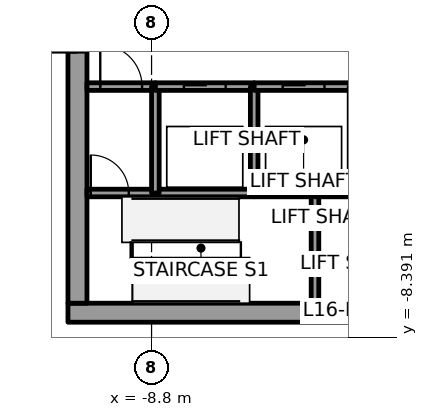
"""IFC4 building model, lengths in metres.
Left out: names, types, materials, properties, quantities, classifications, styles, units other than length and angle.
Written with IfcOpenShell. Run it as: python <this file> out.ifc"""

import sys

from ifc_helpers import new_model, si_unit, direction, frame, frame_2d, origin, place, context, subcontext, project, spatial, rectangle, extrude, element, fill, save


model = new_model("IFC4")
c1 = context("Model", 3, precision=1e-05, world=origin(), true_north=direction((0.0, 1.0)))
c2 = subcontext(c1, "Body", "Model", "MODEL_VIEW")
j1 = project(units=[si_unit("LENGTHUNIT", "METRE"), si_unit("PLANEANGLEUNIT", "RADIAN")], contexts=[c1])
p1 = place(None, origin())
s1 = spatial("IfcSite", under=j1, at=p1, CompositionType="ELEMENT")
p2 = place(p1, origin())
s2 = spatial("IfcBuilding", under=s1, at=p2, CompositionType="ELEMENT")
p3 = place(p2, frame((0.0, 0.0, 81.3)))
s3 = spatial("IfcBuildingStorey", under=s2, at=p3, CompositionType="ELEMENT", Elevation=81.3)
p4 = place(p3, frame((-11.0, -7.75, 0.0), z_axis=(0.0, 0.0, 1.0), x_axis=(1.0, 0.0, 0.0)))
e1 = element("IfcWall", 1, at=p4, inside=s3, PredefinedType="SHEAR", context=c2, shape_type="SweptSolid", body=[
    extrude(rectangle(XDim=22.0, YDim=0.5, at=frame_2d((11.0, 0.0))), origin(), (0.0, 0.0, 1.0), 3.7),
])
p5 = place(p4, frame((10.45, 0.0, 0.0)))
e2 = element("IfcOpeningElement", 2, at=p5, cuts=e1, PredefinedType="OPENING", context=c2, shape_type="SweptSolid", body=[
    extrude(rectangle(XDim=1.1, YDim=2.1, at=frame_2d((0.55, 1.05))), frame((0.0, 0.25, 0.0), z_axis=(0.0, -1.0, 0.0), x_axis=(1.0, 0.0, 0.0)), (0.0, 0.0, 1.0), 0.5),
])
p6 = place(p3, frame((-10.75, -7.5, 0.0), z_axis=(0.0, 0.0, 1.0), x_axis=(0.0, 1.0, 0.0)))
e3 = element("IfcWall", 3, at=p6, inside=s3, PredefinedType="SHEAR", context=c2, shape_type="SweptSolid", body=[
    extrude(rectangle(XDim=15.0, YDim=0.5, at=frame_2d((7.5, 0.0))), origin(), (0.0, 0.0, 1.0), 3.7),
])
p7 = place(p6, frame((6.6, 0.0, 0.0)))
e4 = element("IfcOpeningElement", 4, at=p7, cuts=e3, PredefinedType="OPENING", context=c2, shape_type="SweptSolid", body=[
    extrude(rectangle(XDim=1.8, YDim=2.1, at=frame_2d((0.9, 1.05))), frame((0.0, 0.25, 0.0), z_axis=(0.0, -1.0, 0.0), x_axis=(1.0, 0.0, 0.0)), (0.0, 0.0, 1.0), 0.5),
])
p8 = place(p3, frame((-10.5, -4.6, 0.0), z_axis=(0.0, 0.0, 1.0), x_axis=(1.0, 0.0, 0.0)))
e5 = element("IfcWall", 5, at=p8, inside=s3, PredefinedType="SOLIDWALL", context=c2, shape_type="SweptSolid", body=[
    extrude(rectangle(XDim=1.8, YDim=0.2, at=frame_2d((0.9, 0.0))), origin(), (0.0, 0.0, 1.0), 3.55),
])
p9 = place(p8, frame((0.1, 0.0, 0.0)))
e6 = element("IfcOpeningElement", 6, at=p9, cuts=e5, PredefinedType="OPENING", context=c2, shape_type="SweptSolid", body=[
    extrude(rectangle(XDim=1.0, YDim=2.1, at=frame_2d((0.5, 1.05))), frame((0.0, 0.1, 0.0), z_axis=(0.0, -1.0, 0.0), x_axis=(1.0, 0.0, 0.0)), (0.0, 0.0, 1.0), 0.2),
])
p10 = place(p3, frame((-10.5, -1.8, 0.0), z_axis=(0.0, 0.0, 1.0), x_axis=(1.0, 0.0, 0.0)))
e7 = element("IfcWall", 7, at=p10, inside=s3, PredefinedType="SOLIDWALL", context=c2, shape_type="SweptSolid", body=[
    extrude(rectangle(XDim=1.8, YDim=0.2, at=frame_2d((0.9, 0.0))), origin(), (0.0, 0.0, 1.0), 3.55),
])
p11 = place(p10, frame((0.35, 0.0, 0.0)))
e8 = element("IfcOpeningElement", 8, at=p11, cuts=e7, PredefinedType="OPENING", context=c2, shape_type="SweptSolid", body=[
    extrude(rectangle(XDim=1.1, YDim=2.1, at=frame_2d((0.55, 1.05))), frame((0.0, 0.1, 0.0), z_axis=(0.0, -1.0, 0.0), x_axis=(1.0, 0.0, 0.0)), (0.0, 0.0, 1.0), 0.2),
])
p12 = place(p3, frame((-8.7, -4.6, 0.0), z_axis=(0.0, 0.0, 1.0), x_axis=(1.0, 0.0, 0.0)))
e9 = element("IfcWall", 9, at=p12, inside=s3, PredefinedType="SOLIDWALL", context=c2, shape_type="SweptSolid", body=[
    extrude(rectangle(XDim=2.6, YDim=0.2, at=frame_2d((1.3, 0.0))), origin(), (0.0, 0.0, 1.0), 3.55),
])
p13 = place(p3, frame((-8.7, -4.6, 0.0), z_axis=(0.0, 0.0, 1.0), x_axis=(0.0, 1.0, 0.0)))
e10 = element("IfcWall", 10, at=p13, inside=s3, PredefinedType="SOLIDWALL", context=c2, shape_type="SweptSolid", body=[
    extrude(rectangle(XDim=2.8, YDim=0.2, at=frame_2d((1.4, 0.0))), origin(), (0.0, 0.0, 1.0), 3.55),
])
p14 = place(p3, frame((-8.7, -1.8, 0.0), z_axis=(0.0, 0.0, 1.0), x_axis=(1.0, 0.0, 0.0)))
e11 = element("IfcWall", 11, at=p14, inside=s3, PredefinedType="SOLIDWALL", context=c2, shape_type="SweptSolid", body=[
    extrude(rectangle(XDim=2.6, YDim=0.2, at=frame_2d((1.3, 0.0))), origin(), (0.0, 0.0, 1.0), 3.55),
])
p15 = place(p14, frame((0.75, 0.0, 0.0)))
e12 = element("IfcOpeningElement", 12, at=p15, cuts=e11, PredefinedType="OPENING", context=c2, shape_type="SweptSolid", body=[
    extrude(rectangle(XDim=1.1, YDim=2.1, at=frame_2d((0.55, 1.05))), frame((0.0, 0.1, 0.0), z_axis=(0.0, -1.0, 0.0), x_axis=(1.0, 0.0, 0.0)), (0.0, 0.0, 1.0), 0.2),
])
p16 = place(p3, frame((-6.1, -4.6, 0.0), z_axis=(0.0, 0.0, 1.0), x_axis=(1.0, 0.0, 0.0)))
e13 = element("IfcWall", 13, at=p16, inside=s3, PredefinedType="SOLIDWALL", context=c2, shape_type="SweptSolid", body=[
    extrude(rectangle(XDim=1.6, YDim=0.2, at=frame_2d((0.8, 0.0))), origin(), (0.0, 0.0, 1.0), 3.55),
])
p17 = place(p3, frame((-6.1, -4.6, 0.0), z_axis=(0.0, 0.0, 1.0), x_axis=(0.0, 1.0, 0.0)))
e14 = element("IfcWall", 14, at=p17, inside=s3, PredefinedType="SOLIDWALL", context=c2, shape_type="SweptSolid", body=[
    extrude(rectangle(XDim=2.8, YDim=0.2, at=frame_2d((1.4, 0.0))), origin(), (0.0, 0.0, 1.0), 3.55),
])
p18 = place(p3, frame((-6.1, -1.8, 0.0), z_axis=(0.0, 0.0, 1.0), x_axis=(1.0, 0.0, 0.0)))
e15 = element("IfcWall", 15, at=p18, inside=s3, PredefinedType="SOLIDWALL", context=c2, shape_type="SweptSolid", body=[
    extrude(rectangle(XDim=2.6, YDim=0.2, at=frame_2d((1.3, 0.0))), origin(), (0.0, 0.0, 1.0), 3.55),
])
p19 = place(p18, frame((0.75, 0.0, 0.0)))
e16 = element("IfcOpeningElement", 16, at=p19, cuts=e15, PredefinedType="OPENING", context=c2, shape_type="SweptSolid", body=[
    extrude(rectangle(XDim=1.1, YDim=2.1, at=frame_2d((0.55, 1.05))), frame((0.0, 0.1, 0.0), z_axis=(0.0, -1.0, 0.0), x_axis=(1.0, 0.0, 0.0)), (0.0, 0.0, 1.0), 0.2),
])
p20 = place(p3, frame((-4.5, -4.6, 0.0), z_axis=(0.0, 0.0, 1.0), x_axis=(0.0, -1.0, 0.0)))
e17 = element("IfcWall", 17, at=p20, inside=s3, PredefinedType="SOLIDWALL", context=c2, shape_type="SweptSolid", body=[
    extrude(rectangle(XDim=2.9, YDim=0.2, at=frame_2d((1.45, 0.0))), origin(), (0.0, 0.0, 1.0), 3.55),
])
p21 = place(p3, frame((-4.5, -4.6, 0.0), z_axis=(0.0, 0.0, 1.0), x_axis=(1.0, 0.0, 0.0)))
e18 = element("IfcWall", 18, at=p21, inside=s3, PredefinedType="SOLIDWALL", context=c2, shape_type="SweptSolid", body=[
    extrude(rectangle(XDim=1.0, YDim=0.2, at=frame_2d((0.5, 0.0))), origin(), (0.0, 0.0, 1.0), 3.55),
])
p22 = place(p15, origin())
e19 = element("IfcDoor", 19, at=p22, inside=s3, OperationType="SLIDING_TO_RIGHT", PredefinedType="DOOR", context=c2, shape_type="SweptSolid", body=[
    extrude(rectangle(XDim=1.1, YDim=2.1, at=frame_2d((0.55, 1.05))), frame((0.0, 0.025, 0.0), z_axis=(0.0, -1.0, 0.0), x_axis=(1.0, 0.0, 0.0)), (0.0, 0.0, 1.0), 0.05),
])
fill(e12, e19)
p23 = place(p19, origin())
e20 = element("IfcDoor", 20, at=p23, inside=s3, OperationType="SLIDING_TO_LEFT", PredefinedType="DOOR", context=c2, shape_type="SweptSolid", body=[
    extrude(rectangle(XDim=1.1, YDim=2.1, at=frame_2d((0.55, 1.05))), frame((0.0, 0.025, 0.0), z_axis=(0.0, -1.0, 0.0), x_axis=(1.0, 0.0, 0.0)), (0.0, 0.0, 1.0), 0.05),
])
fill(e16, e20)
p24 = place(p11, origin())
e21 = element("IfcDoor", 21, at=p24, inside=s3, OperationType="SINGLE_SWING_LEFT", PredefinedType="DOOR", context=c2, shape_type="SweptSolid", body=[
    extrude(rectangle(XDim=1.1, YDim=2.1, at=frame_2d((0.55, 1.05))), frame((0.0, 0.025, 0.0), z_axis=(0.0, -1.0, 0.0), x_axis=(1.0, 0.0, 0.0)), (0.0, 0.0, 1.0), 0.05),
])
fill(e8, e21)
p25 = place(p9, origin())
e22 = element("IfcDoor", 22, at=p25, inside=s3, OperationType="SINGLE_SWING_LEFT", PredefinedType="DOOR", context=c2, shape_type="SweptSolid", body=[
    extrude(rectangle(XDim=1.0, YDim=2.1, at=frame_2d((0.5, 1.05))), frame((0.0, 0.025, 0.0), z_axis=(0.0, -1.0, 0.0), x_axis=(1.0, 0.0, 0.0)), (0.0, 0.0, 1.0), 0.05),
])
fill(e6, e22)
p26 = place(p7, origin())
e23 = element("IfcDoor", 23, at=p26, inside=s3, OperationType="DOUBLE_DOOR_SINGLE_SWING", PredefinedType="DOOR", context=c2, shape_type="SweptSolid", body=[
    extrude(rectangle(XDim=1.8, YDim=2.1, at=frame_2d((0.9, 1.05))), frame((0.0, 0.025, 0.0), z_axis=(0.0, -1.0, 0.0), x_axis=(1.0, 0.0, 0.0)), (0.0, 0.0, 1.0), 0.05),
])
fill(e4, e23)
save(model, sys.argv[1])
